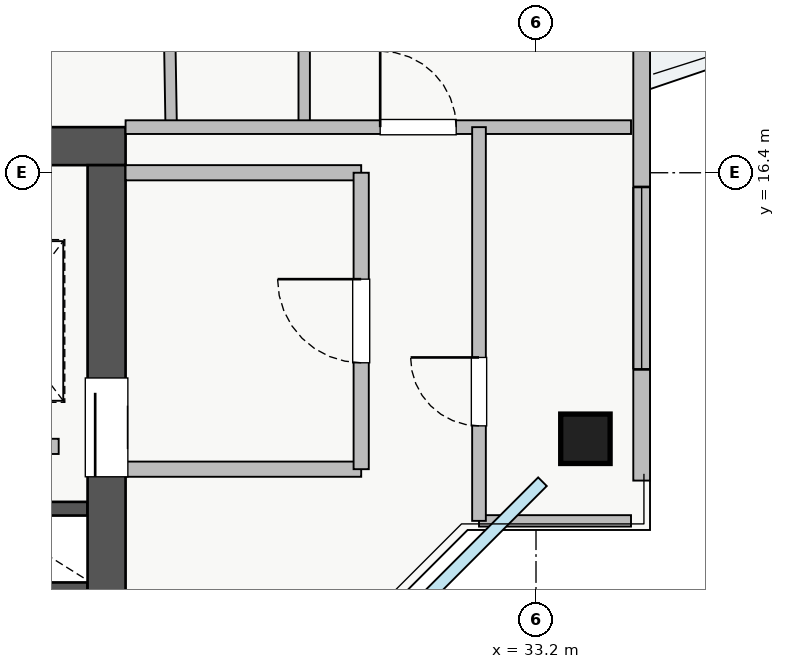
"""IFC4 building model, lengths in metres.
Left out: names, types, materials, properties, quantities, classifications, styles, units other than length and angle.
Written with IfcOpenShell. Run it as: python <this file> out.ifc"""

import sys

from ifc_helpers import new_model, si_unit, direction, frame, frame_2d, origin, origin_2d, place, context, subcontext, project, spatial, rectangle, extrude, source, transform, mapped, element, fill, save


model = new_model("IFC4")
c1 = context("Model", 3, precision=1e-05, world=origin(), true_north=direction((0.0, 1.0)))
c2 = subcontext(c1, "Body", "Model", "MODEL_VIEW")
j1 = project(units=[si_unit("LENGTHUNIT", "METRE"), si_unit("PLANEANGLEUNIT", "RADIAN")], contexts=[c1])
p1 = place(None, origin())
s1 = spatial("IfcSite", under=j1, at=p1, CompositionType="ELEMENT")
p2 = place(p1, origin())
s2 = spatial("IfcBuilding", under=s1, at=p2, CompositionType="ELEMENT")
p3 = place(p2, frame((0.0, 0.0, 260.0)))
s3 = spatial("IfcBuildingStorey", under=s2, at=p3, CompositionType="ELEMENT", Elevation=260.0)
for number, where, z_axis, x_axis in (
    (1, (25.8, 11.98, 0.0), (0.0, 0.0, 1.0), (1.0, 0.0, 0.0)),
    (2, (25.8, 10.92, 0.0), (0.0, 0.0, 1.0), (1.0, 0.0, 0.0)),
):
    element("IfcWall", number, at=place(p3, frame(where, z_axis=z_axis, x_axis=x_axis)), inside=s3, PredefinedType="SHEAR", context=c2, shape_type="SweptSolid", body=[
        extrude(rectangle(XDim=1.5, YDim=0.18, at=frame_2d((0.75, 0.0))), origin(), (0.0, 0.0, 1.0), 3.03),
    ])
p4 = place(p3, frame((10.2, 16.75, 0.0), z_axis=(0.0, 0.0, 1.0), x_axis=(1.0, 0.0, 0.0)))
e3 = element("IfcWall", 3, at=p4, inside=s3, PredefinedType="SHEAR", context=c2, shape_type="SweptSolid", body=[
    extrude(rectangle(XDim=17.6, YDim=0.5, at=frame_2d((8.8, 0.0))), origin(), (0.0, 0.0, 1.0), 3.25),
])
p5 = place(p3, frame((27.55, 10.3, 0.0), z_axis=(0.0, 0.0, 1.0), x_axis=(0.0, 1.0, 0.0)))
e4 = element("IfcWall", 4, at=p5, inside=s3, PredefinedType="SHEAR", context=c2, shape_type="SweptSolid", body=[
    extrude(rectangle(XDim=6.2, YDim=0.5, at=frame_2d((3.1, 0.0))), origin(), (0.0, 0.0, 1.0), 3.25),
])
p6 = place(p5, frame((2.1, 0.0, 0.0)))
e5 = element("IfcOpeningElement", 5, at=p6, cuts=e4, PredefinedType="OPENING", context=c2, shape_type="SweptSolid", body=[
    extrude(rectangle(XDim=1.3, YDim=2.05, at=frame_2d((0.65, 1.025))), frame((0.0, 0.26, 0.0), z_axis=(0.0, -1.0, 0.0), x_axis=(1.0, 0.0, 0.0)), (0.0, 0.0, 1.0), 0.52),
])
m1 = source(origin(), c2, "Body", "SweptSolid", [
    extrude(rectangle(XDim=0.65, YDim=0.65, at=origin_2d()), origin(), (0.0, 0.0, 1.0), 3.25),
])
p7 = place(p3, frame((33.85, 12.9, 0.0), z_axis=(0.0, 0.0, 1.0), x_axis=(1.0, 0.0, 0.0)))
e6 = element("IfcColumn", 6, at=p7, inside=s3, PredefinedType="COLUMN", context=c2, shape_type="MappedRepresentation", body=[
    mapped(m1, transform((0.0, 0.0, 0.0), x_axis=(1.0, 0.0, 0.0), y_axis=(0.0, 1.0, 0.0), z_axis=(0.0, 0.0, 1.0), scale=1.0)),
])
p8 = place(p3, frame((34.59, 12.35, 0.0), z_axis=(0.0, 0.0, 1.0), x_axis=(0.0, 1.0, 0.0)))
e7 = element("IfcWall", 7, at=p8, inside=s3, PredefinedType="STANDARD", context=c2, shape_type="SweptSolid", body=[
    extrude(rectangle(XDim=21.3, YDim=0.22, at=frame_2d((10.65, 0.0))), origin(), (0.0, 0.0, 1.0), 2.57),
])
p9 = place(p8, frame((11.5, 0.0, 0.0)))
e8 = element("IfcOpeningElement", 8, at=p9, cuts=e7, PredefinedType="OPENING", context=c2, shape_type="SweptSolid", body=[
    extrude(rectangle(XDim=1.2, YDim=2.1, at=frame_2d((0.6, 1.05))), frame((0.0, 0.12, 0.0), z_axis=(0.0, -1.0, 0.0), x_axis=(1.0, 0.0, 0.0)), (0.0, 0.0, 1.0), 0.24),
])
p10 = place(p8, frame((1.463, 0.0, 0.9)))
e9 = element("IfcOpeningElement", 9, at=p10, cuts=e7, PredefinedType="OPENING", context=c2, shape_type="SweptSolid", body=[
    extrude(rectangle(XDim=2.4, YDim=1.48, at=frame_2d((1.2, 0.74))), frame((0.0, 0.12, 0.0), z_axis=(0.0, -1.0, 0.0), x_axis=(1.0, 0.0, 0.0)), (0.0, 0.0, 1.0), 0.24),
])
p11 = place(p8, frame((17.588, 0.0, 0.9)))
e10 = element("IfcOpeningElement", 10, at=p11, cuts=e7, PredefinedType="OPENING", context=c2, shape_type="SweptSolid", body=[
    extrude(rectangle(XDim=2.1, YDim=1.48, at=frame_2d((1.05, 0.74))), frame((0.0, 0.12, 0.0), z_axis=(0.0, -1.0, 0.0), x_axis=(1.0, 0.0, 0.0)), (0.0, 0.0, 1.0), 0.24),
])
for number, where, z_axis, x_axis in (
    (11, (27.8, 16.4, 0.0), (0.0, 0.0, 1.0), (1.0, 0.0, 0.0)),
    (12, (27.8, 12.5, 0.0), (0.0, 0.0, 1.0), (1.0, 0.0, 0.0)),
):
    element("IfcWall", number, at=place(p3, frame(where, z_axis=z_axis, x_axis=x_axis)), inside=s3, PredefinedType="PARTITIONING", context=c2, shape_type="SweptSolid", body=[
        extrude(rectangle(XDim=3.1, YDim=0.2, at=frame_2d((1.55, 0.0))), origin(), (0.0, 0.0, 1.0), 3.03),
    ])
p12 = place(p3, frame((30.9, 12.5, 0.0), z_axis=(0.0, 0.0, 1.0), x_axis=(0.0, 1.0, 0.0)))
e13 = element("IfcWall", 13, at=p12, inside=s3, PredefinedType="PARTITIONING", context=c2, shape_type="SweptSolid", body=[
    extrude(rectangle(XDim=3.9, YDim=0.2, at=frame_2d((1.95, 0.0))), origin(), (0.0, 0.0, 1.0), 2.781),
])
p13 = place(p12, frame((1.4, 0.0, 0.0)))
e14 = element("IfcOpeningElement", 14, at=p13, cuts=e13, PredefinedType="OPENING", context=c2, shape_type="SweptSolid", body=[
    extrude(rectangle(XDim=1.1, YDim=2.05, at=frame_2d((0.55, 1.025))), frame((0.0, 0.11, 0.0), z_axis=(0.0, -1.0, 0.0), x_axis=(1.0, 0.0, 0.0)), (0.0, 0.0, 1.0), 0.22),
])
p14 = place(p3, frame((21.75, 12.8, 0.0), z_axis=(0.0, 0.0, 1.0), x_axis=(1.0, 0.0, 0.0)))
e15 = element("IfcWall", 15, at=p14, inside=s3, PredefinedType="PARTITIONING", context=c2, shape_type="SweptSolid", body=[
    extrude(rectangle(XDim=5.17, YDim=0.2, at=frame_2d((2.585, 0.0))), origin(), (0.0, 0.0, 1.0), 3.03),
])
p15 = place(p3, frame((28.2, 29.0, 0.0), z_axis=(0.0, 0.0, 1.0), x_axis=(0.016660285018, -0.99986120782, 0.0)))
e16 = element("IfcWall", 16, at=p15, inside=s3, PredefinedType="PARTITIONING", context=c2, shape_type="SweptSolid", body=[
    extrude(rectangle(XDim=12.002, YDim=0.15, at=frame_2d((6.001, 0.0))), origin(), (0.0, 0.0, 1.0), 3.03),
])
p16 = place(p15, frame((5.902, 0.0, 0.0)))
e17 = element("IfcOpeningElement", 17, at=p16, cuts=e16, PredefinedType="OPENING", context=c2, shape_type="SweptSolid", body=[
    extrude(rectangle(XDim=0.9, YDim=2.05, at=frame_2d((0.45, 1.025))), frame((0.0, 0.085, 0.0), z_axis=(0.0, -1.0, 0.0), x_axis=(1.0, 0.0, 0.0)), (0.0, 0.0, 1.0), 0.17),
])
p17 = place(p3, frame((30.15, 17.0, 0.0), z_axis=(0.0, 0.0, 1.0), x_axis=(0.0, 1.0, 0.0)))
e18 = element("IfcWall", 18, at=p17, inside=s3, PredefinedType="PARTITIONING", context=c2, shape_type="SweptSolid", body=[
    extrude(rectangle(XDim=12.0, YDim=0.15, at=frame_2d((6.0, 0.0))), origin(), (0.0, 0.0, 1.0), 3.03),
])
p18 = place(p17, frame((5.2, 0.0, 0.0)))
e19 = element("IfcOpeningElement", 19, at=p18, cuts=e18, PredefinedType="OPENING", context=c2, shape_type="SweptSolid", body=[
    extrude(rectangle(XDim=0.9, YDim=2.05, at=frame_2d((0.45, 1.025))), frame((0.0, 0.085, 0.0), z_axis=(0.0, -1.0, 0.0), x_axis=(1.0, 0.0, 0.0)), (0.0, 0.0, 1.0), 0.17),
])
p19 = place(p3, frame((27.8, 17.0, 0.0), z_axis=(0.0, 0.0, 1.0), x_axis=(1.0, 0.0, 0.0)))
e20 = element("IfcWall", 20, at=p19, inside=s3, PredefinedType="PARTITIONING", context=c2, shape_type="SweptSolid", body=[
    extrude(rectangle(XDim=6.65, YDim=0.18, at=frame_2d((3.325, 0.0))), origin(), (0.0, 0.0, 1.0), 3.03),
])
p20 = place(p19, frame((3.35, 0.0, 0.0)))
e21 = element("IfcOpeningElement", 21, at=p20, cuts=e20, PredefinedType="OPENING", context=c2, shape_type="SweptSolid", body=[
    extrude(rectangle(XDim=1.0, YDim=2.05, at=frame_2d((0.5, 1.025))), frame((0.0, 0.1, 0.0), z_axis=(0.0, -1.0, 0.0), x_axis=(1.0, 0.0, 0.0)), (0.0, 0.0, 1.0), 0.2),
])
p21 = place(p3, frame((32.45, 11.82, 0.0), z_axis=(0.0, 0.0, 1.0), x_axis=(1.0, 0.0, 0.0)))
e22 = element("IfcWall", 22, at=p21, inside=s3, PredefinedType="PARTITIONING", context=c2, shape_type="SweptSolid", body=[
    extrude(rectangle(XDim=2.0, YDim=0.15, at=frame_2d((1.0, 0.0))), origin(), (0.0, 0.0, 1.0), 3.03),
])
p22 = place(p3, frame((32.45, 11.82, 0.0), z_axis=(0.0, 0.0, 1.0), x_axis=(0.0, 1.0, 0.0)))
e23 = element("IfcWall", 23, at=p22, inside=s3, PredefinedType="PARTITIONING", context=c2, shape_type="SweptSolid", body=[
    extrude(rectangle(XDim=5.18, YDim=0.18, at=frame_2d((2.59, 0.0))), origin(), (0.0, 0.0, 1.0), 3.03),
])
p23 = place(p22, frame((1.25, 0.0, 0.0)))
e24 = element("IfcOpeningElement", 24, at=p23, cuts=e23, PredefinedType="OPENING", context=c2, shape_type="SweptSolid", body=[
    extrude(rectangle(XDim=0.9, YDim=2.05, at=frame_2d((0.45, 1.025))), frame((0.0, 0.1, 0.0), z_axis=(0.0, -1.0, 0.0), x_axis=(1.0, 0.0, 0.0)), (0.0, 0.0, 1.0), 0.2),
])
m2 = source(origin(), c2, "Body", "SweptSolid", [
    extrude(rectangle(XDim=2.4, YDim=1.48, at=frame_2d((1.2, 0.74))), frame((0.0, 0.03, 0.0), z_axis=(0.0, -1.0, 0.0), x_axis=(1.0, 0.0, 0.0)), (0.0, 0.0, 1.0), 0.06),
])
p24 = place(p10, origin())
e25 = element("IfcWindow", 25, at=p24, inside=s3, PartitioningType="TRIPLE_PANEL_VERTICAL", PredefinedType="WINDOW", context=c2, shape_type="MappedRepresentation", body=[
    mapped(m2, transform((0.0, 0.0, 0.0), x_axis=(1.0, 0.0, 0.0), y_axis=(0.0, 1.0, 0.0), z_axis=(0.0, 0.0, 1.0), scale=1.0)),
])
fill(e9, e25)
m3 = source(origin(), c2, "Body", "SweptSolid", [
    extrude(rectangle(XDim=1.3, YDim=2.05, at=frame_2d((0.65, 1.025))), frame((0.0, 0.025, 0.0), z_axis=(0.0, -1.0, 0.0), x_axis=(1.0, 0.0, 0.0)), (0.0, 0.0, 1.0), 0.05),
])
p25 = place(p6, origin())
e26 = element("IfcDoor", 26, at=p25, inside=s3, OperationType="SLIDING_TO_RIGHT", PredefinedType="DOOR", context=c2, shape_type="MappedRepresentation", body=[
    mapped(m3, transform((0.0, 0.0, 0.0), x_axis=(1.0, 0.0, 0.0), y_axis=(0.0, 1.0, 0.0), z_axis=(0.0, 0.0, 1.0), scale=1.0)),
])
fill(e5, e26)
m4 = source(origin(), c2, "Body", "SweptSolid", [
    extrude(rectangle(XDim=1.1, YDim=2.05, at=frame_2d((0.55, 1.025))), frame((0.0, 0.025, 0.0), z_axis=(0.0, -1.0, 0.0), x_axis=(1.0, 0.0, 0.0)), (0.0, 0.0, 1.0), 0.05),
])
p26 = place(p13, origin())
e27 = element("IfcDoor", 27, at=p26, inside=s3, OperationType="SINGLE_SWING_RIGHT", PredefinedType="DOOR", context=c2, shape_type="MappedRepresentation", body=[
    mapped(m4, transform((0.0, 0.0, 0.0), x_axis=(1.0, 0.0, 0.0), y_axis=(0.0, 1.0, 0.0), z_axis=(0.0, 0.0, 1.0), scale=1.0)),
])
fill(e14, e27)
m5 = source(origin(), c2, "Body", "SweptSolid", [
    extrude(rectangle(XDim=1.0, YDim=2.05, at=frame_2d((0.5, 1.025))), frame((0.0, 0.025, 0.0), z_axis=(0.0, -1.0, 0.0), x_axis=(1.0, 0.0, 0.0)), (0.0, 0.0, 1.0), 0.05),
])
p27 = place(p20, origin())
e28 = element("IfcDoor", 28, at=p27, inside=s3, OperationType="SINGLE_SWING_LEFT", PredefinedType="DOOR", context=c2, shape_type="MappedRepresentation", body=[
    mapped(m5, transform((0.0, 0.0, 0.0), x_axis=(1.0, 0.0, 0.0), y_axis=(0.0, 1.0, 0.0), z_axis=(0.0, 0.0, 1.0), scale=1.0)),
])
fill(e21, e28)
m6 = source(origin(), c2, "Body", "SweptSolid", [
    extrude(rectangle(XDim=0.9, YDim=2.05, at=frame_2d((0.45, 1.025))), frame((0.0, 0.025, 0.0), z_axis=(0.0, -1.0, 0.0), x_axis=(1.0, 0.0, 0.0)), (0.0, 0.0, 1.0), 0.05),
])
p28 = place(p23, origin())
e29 = element("IfcDoor", 29, at=p28, inside=s3, OperationType="SINGLE_SWING_RIGHT", PredefinedType="DOOR", context=c2, shape_type="MappedRepresentation", body=[
    mapped(m6, transform((0.0, 0.0, 0.0), x_axis=(1.0, 0.0, 0.0), y_axis=(0.0, 1.0, 0.0), z_axis=(0.0, 0.0, 1.0), scale=1.0)),
])
fill(e24, e29)
save(model, sys.argv[1])
